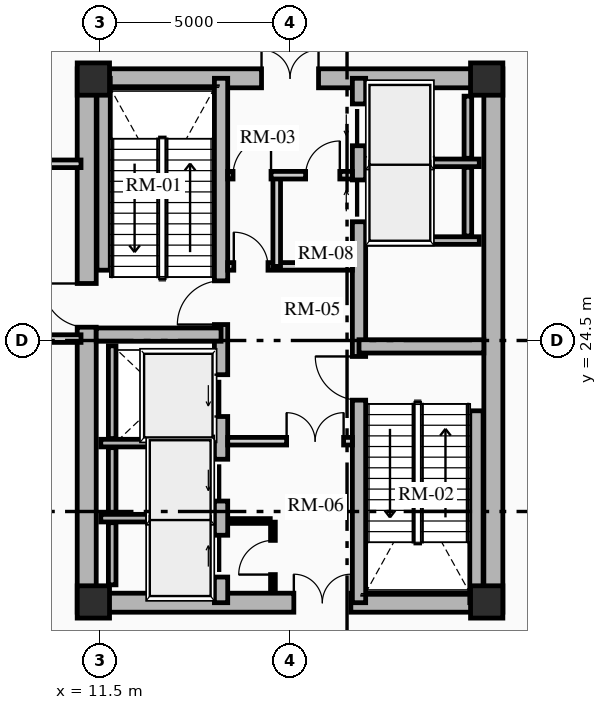
"""IFC4 building model, lengths in metres.
Left out: names, types, materials, properties, quantities, classifications, styles, units other than length and angle.
Written with IfcOpenShell. Run it as: python <this file> out.ifc"""

import sys

from ifc_helpers import new_model, si_unit, direction, frame, frame_2d, origin, origin_2d, place, context, subcontext, project, spatial, rectangle, extrude, source, transform, mapped, element, fill, save


model = new_model("IFC4")
c1 = context("Model", 3, precision=1e-05, world=origin(), true_north=direction((0.0, 1.0)))
c2 = subcontext(c1, "Body", "Model", "MODEL_VIEW")
j1 = project(units=[si_unit("LENGTHUNIT", "METRE"), si_unit("PLANEANGLEUNIT", "RADIAN")], contexts=[c1])
p1 = place(None, origin())
s1 = spatial("IfcSite", under=j1, at=p1, CompositionType="ELEMENT")
p2 = place(p1, origin())
s2 = spatial("IfcBuilding", under=s1, at=p2, CompositionType="ELEMENT")
p3 = place(p2, origin())
s3 = spatial("IfcBuildingStorey", under=s2, at=p3, CompositionType="ELEMENT", Elevation=0.0)
p4 = place(p3, frame((11.15, 17.35, 0.0), z_axis=(0.0, 0.0, 1.0), x_axis=(0.0, 1.0, 0.0)))
e1 = element("IfcWall", 1, at=p4, inside=s3, PredefinedType="SHEAR", context=c2, shape_type="SweptSolid", body=[
    extrude(rectangle(XDim=14.3, YDim=0.5, at=frame_2d((7.15, 0.0))), origin(), (0.0, 0.0, 1.0), 4.8),
])
m1 = source(origin(), c2, "Body", "SweptSolid", [
    extrude(rectangle(XDim=1.15, YDim=2.02, at=frame_2d((0.575, 1.01))), frame((0.0, 0.26, 0.0), z_axis=(0.0, -1.0, 0.0), x_axis=(1.0, 0.0, 0.0)), (0.0, 0.0, 1.0), 0.52),
])
p5 = place(p4, frame((7.5, 0.0, 0.0)))
e2 = element("IfcOpeningElement", 2, at=p5, cuts=e1, PredefinedType="OPENING", context=c2, shape_type="MappedRepresentation", body=[
    mapped(m1, transform((0.0, 0.0, 0.0), x_axis=(1.0, 0.0, 0.0), y_axis=(0.0, 1.0, 0.0), z_axis=(0.0, 0.0, 1.0), scale=1.0)),
])
p6 = place(p3, frame((21.85, 17.35, 0.0), z_axis=(0.0, 0.0, 1.0), x_axis=(0.0, 1.0, 0.0)))
e3 = element("IfcWall", 3, at=p6, inside=s3, PredefinedType="SHEAR", context=c2, shape_type="SweptSolid", body=[
    extrude(rectangle(XDim=14.3, YDim=0.5, at=frame_2d((7.15, 0.0))), origin(), (0.0, 0.0, 1.0), 4.8),
])
p7 = place(p3, frame((11.15, 17.6, 0.0), z_axis=(0.0, 0.0, 1.0), x_axis=(1.0, 0.0, 0.0)))
e4 = element("IfcWall", 4, at=p7, inside=s3, PredefinedType="SHEAR", context=c2, shape_type="SweptSolid", body=[
    extrude(rectangle(XDim=10.7, YDim=0.5, at=frame_2d((5.35, 0.0))), origin(), (0.0, 0.0, 1.0), 4.8),
])
m2 = source(origin(), c2, "Body", "SweptSolid", [
    extrude(rectangle(XDim=1.5, YDim=2.02, at=frame_2d((0.75, 1.01))), frame((0.0, 0.26, 0.0), z_axis=(0.0, -1.0, 0.0), x_axis=(1.0, 0.0, 0.0)), (0.0, 0.0, 1.0), 0.52),
])
p8 = place(p7, frame((5.45, 0.0, 0.0)))
e5 = element("IfcOpeningElement", 5, at=p8, cuts=e4, PredefinedType="OPENING", context=c2, shape_type="MappedRepresentation", body=[
    mapped(m2, transform((0.0, 0.0, 0.0), x_axis=(1.0, 0.0, 0.0), y_axis=(0.0, 1.0, 0.0), z_axis=(0.0, 0.0, 1.0), scale=1.0)),
])
p9 = place(p3, frame((11.15, 31.4, 0.0), z_axis=(0.0, 0.0, 1.0), x_axis=(1.0, 0.0, 0.0)))
e6 = element("IfcWall", 6, at=p9, inside=s3, PredefinedType="SHEAR", context=c2, shape_type="SweptSolid", body=[
    extrude(rectangle(XDim=10.7, YDim=0.5, at=frame_2d((5.35, 0.0))), origin(), (0.0, 0.0, 1.0), 4.8),
])
p10 = place(p9, frame((4.6, 0.0, 0.0)))
e7 = element("IfcOpeningElement", 7, at=p10, cuts=e6, PredefinedType="OPENING", context=c2, shape_type="MappedRepresentation", body=[
    mapped(m2, transform((0.0, 0.0, 0.0), x_axis=(1.0, 0.0, 0.0), y_axis=(0.0, 1.0, 0.0), z_axis=(0.0, 0.0, 1.0), scale=1.0)),
])
p11 = place(p3, frame((14.685, 17.6, 0.0), z_axis=(0.0, 0.0, 1.0), x_axis=(0.0, 1.0, 0.0)))
e8 = element("IfcWall", 8, at=p11, inside=s3, PredefinedType="SHEAR", context=c2, shape_type="SweptSolid", body=[
    extrude(rectangle(XDim=13.8, YDim=0.35, at=frame_2d((6.9, 0.0))), origin(), (0.0, 0.0, 1.0), 4.8),
])
m3 = source(origin(), c2, "Body", "SweptSolid", [
    extrude(rectangle(XDim=1.1, YDim=2.015, at=frame_2d((0.55, 1.007))), frame((0.0, 0.185, 0.0), z_axis=(0.0, -1.0, 0.0), x_axis=(1.0, 0.0, 0.0)), (0.0, 0.0, 1.0), 0.37),
])
p12 = place(p11, frame((4.9, 0.0, 0.0)))
e9 = element("IfcOpeningElement", 9, at=p12, cuts=e8, PredefinedType="OPENING", context=c2, shape_type="MappedRepresentation", body=[
    mapped(m3, transform((0.0, 0.0, 0.0), x_axis=(1.0, 0.0, 0.0), y_axis=(0.0, 1.0, 0.0), z_axis=(0.0, 0.0, 1.0), scale=1.0)),
])
p13 = place(p11, frame((0.675, 0.0, 0.0)))
e10 = element("IfcOpeningElement", 10, at=p13, cuts=e8, PredefinedType="OPENING", context=c2, shape_type="MappedRepresentation", body=[
    mapped(m3, transform((0.0, 0.0, 0.0), x_axis=(1.0, 0.0, 0.0), y_axis=(0.0, 1.0, 0.0), z_axis=(0.0, 0.0, 1.0), scale=1.0)),
])
p14 = place(p11, frame((2.675, 0.0, 0.0)))
e11 = element("IfcOpeningElement", 11, at=p14, cuts=e8, PredefinedType="OPENING", context=c2, shape_type="MappedRepresentation", body=[
    mapped(m3, transform((0.0, 0.0, 0.0), x_axis=(1.0, 0.0, 0.0), y_axis=(0.0, 1.0, 0.0), z_axis=(0.0, 0.0, 1.0), scale=1.0)),
])
m4 = source(origin(), c2, "Body", "SweptSolid", [
    extrude(rectangle(XDim=1.15, YDim=2.02, at=frame_2d((0.575, 1.01))), frame((0.0, 0.185, 0.0), z_axis=(0.0, -1.0, 0.0), x_axis=(1.0, 0.0, 0.0)), (0.0, 0.0, 1.0), 0.37),
])
p15 = place(p11, frame((7.32, 0.0, 0.0)))
e12 = element("IfcOpeningElement", 12, at=p15, cuts=e8, PredefinedType="OPENING", context=c2, shape_type="MappedRepresentation", body=[
    mapped(m4, transform((0.0, 0.0, 0.0), x_axis=(1.0, 0.0, 0.0), y_axis=(0.0, 1.0, 0.0), z_axis=(0.0, 0.0, 1.0), scale=1.0)),
])
p16 = place(p3, frame((18.315, 17.6, 0.0), z_axis=(0.0, 0.0, 1.0), x_axis=(0.0, 1.0, 0.0)))
e13 = element("IfcWall", 13, at=p16, inside=s3, PredefinedType="SHEAR", context=c2, shape_type="SweptSolid", body=[
    extrude(rectangle(XDim=13.8, YDim=0.35, at=frame_2d((6.9, 0.0))), origin(), (0.0, 0.0, 1.0), 4.8),
])
p17 = place(p16, frame((10.025, 0.0, 0.0)))
e14 = element("IfcOpeningElement", 14, at=p17, cuts=e13, PredefinedType="OPENING", context=c2, shape_type="MappedRepresentation", body=[
    mapped(m3, transform((0.0, 0.0, 0.0), x_axis=(1.0, 0.0, 0.0), y_axis=(0.0, 1.0, 0.0), z_axis=(0.0, 0.0, 1.0), scale=1.0)),
])
p18 = place(p16, frame((12.025, 0.0, 0.0)))
e15 = element("IfcOpeningElement", 15, at=p18, cuts=e13, PredefinedType="OPENING", context=c2, shape_type="MappedRepresentation", body=[
    mapped(m3, transform((0.0, 0.0, 0.0), x_axis=(1.0, 0.0, 0.0), y_axis=(0.0, 1.0, 0.0), z_axis=(0.0, 0.0, 1.0), scale=1.0)),
])
p19 = place(p16, frame((5.33, 0.0, 0.0)))
e16 = element("IfcOpeningElement", 16, at=p19, cuts=e13, PredefinedType="OPENING", context=c2, shape_type="MappedRepresentation", body=[
    mapped(m4, transform((0.0, 0.0, 0.0), x_axis=(1.0, 0.0, 0.0), y_axis=(0.0, 1.0, 0.0), z_axis=(0.0, 0.0, 1.0), scale=1.0)),
])
p20 = place(p3, frame((11.595, 26.35, 0.0), z_axis=(0.0, 0.0, 1.0), x_axis=(0.0, 1.0, 0.0)))
e17 = element("IfcWall", 17, at=p20, inside=s3, PredefinedType="SHEAR", context=c2, shape_type="SweptSolid", body=[
    extrude(rectangle(XDim=5.05, YDim=0.35, at=frame_2d((2.525, 0.0))), origin(), (0.0, 0.0, 1.0), 4.8),
])
p21 = place(p3, frame((11.4, 24.655, 0.0), z_axis=(0.0, 0.0, 1.0), x_axis=(1.0, 0.0, 0.0)))
e18 = element("IfcWall", 18, at=p21, inside=s3, PredefinedType="SHEAR", context=c2, shape_type="SweptSolid", body=[
    extrude(rectangle(XDim=3.285, YDim=0.35, at=frame_2d((1.643, 0.0))), origin(), (0.0, 0.0, 1.0), 4.8),
])
p22 = place(p3, frame((21.405, 17.6, 0.0), z_axis=(0.0, 0.0, 1.0), x_axis=(0.0, 1.0, 0.0)))
e19 = element("IfcWall", 19, at=p22, inside=s3, PredefinedType="SHEAR", context=c2, shape_type="SweptSolid", body=[
    extrude(rectangle(XDim=5.05, YDim=0.35, at=frame_2d((2.525, 0.0))), origin(), (0.0, 0.0, 1.0), 4.8),
])
p23 = place(p3, frame((18.315, 24.345, 0.0), z_axis=(0.0, 0.0, 1.0), x_axis=(1.0, 0.0, 0.0)))
e20 = element("IfcWall", 20, at=p23, inside=s3, PredefinedType="SHEAR", context=c2, shape_type="SweptSolid", body=[
    extrude(rectangle(XDim=3.285, YDim=0.35, at=frame_2d((1.643, 0.0))), origin(), (0.0, 0.0, 1.0), 4.8),
])
for number, where, z_axis, x_axis in (
    (21, (11.325, 17.62, 0.0), (0.0, 0.0, 1.0), (1.0, 0.0, 0.0)),
    (22, (11.325, 31.38, 0.0), (0.0, 0.0, 1.0), (1.0, 0.0, 0.0)),
    (23, (21.675, 17.62, 0.0), (0.0, 0.0, 1.0), (1.0, 0.0, 0.0)),
    (24, (21.675, 31.38, 0.0), (0.0, 0.0, 1.0), (1.0, 0.0, 0.0)),
):
    element("IfcColumn", number, at=place(p3, frame(where, z_axis=z_axis, x_axis=x_axis)), inside=s3, PredefinedType="COLUMN", context=c2, shape_type="SweptSolid", body=[
        extrude(rectangle(XDim=0.85, YDim=0.85, at=origin_2d()), origin(), (0.0, 0.0, 1.0), 4.8),
    ])
p24 = place(p3, frame((11.52, 21.8, 0.0), z_axis=(0.0, 0.0, 1.0), x_axis=(1.0, 0.0, 0.0)))
e25 = element("IfcWall", 25, at=p24, inside=s3, PredefinedType="SHEAR", context=c2, shape_type="SweptSolid", body=[
    extrude(rectangle(XDim=2.97, YDim=0.2, at=frame_2d((1.485, 0.0))), origin(), (0.0, 0.0, 1.0), 4.8),
])
p25 = place(p3, frame((11.82, 21.92, 0.0), z_axis=(0.0, 0.0, 1.0), x_axis=(0.0, 1.0, 0.0)))
e26 = element("IfcWall", 26, at=p25, inside=s3, PredefinedType="SHEAR", context=c2, shape_type="SweptSolid", body=[
    extrude(rectangle(XDim=2.44, YDim=0.2, at=frame_2d((1.22, 0.0))), origin(), (0.0, 0.0, 1.0), 4.8),
])
p26 = place(p3, frame((11.52, 19.825, 0.0), z_axis=(0.0, 0.0, 1.0), x_axis=(1.0, 0.0, 0.0)))
e27 = element("IfcWall", 27, at=p26, inside=s3, PredefinedType="SHEAR", context=c2, shape_type="SweptSolid", body=[
    extrude(rectangle(XDim=2.97, YDim=0.2, at=frame_2d((1.485, 0.0))), origin(), (0.0, 0.0, 1.0), 4.8),
])
p27 = place(p3, frame((11.82, 19.945, 0.0), z_axis=(0.0, 0.0, 1.0), x_axis=(0.0, 1.0, 0.0)))
e28 = element("IfcWall", 28, at=p27, inside=s3, PredefinedType="SHEAR", context=c2, shape_type="SweptSolid", body=[
    extrude(rectangle(XDim=1.735, YDim=0.2, at=frame_2d((0.867, 0.0))), origin(), (0.0, 0.0, 1.0), 4.8),
])
p28 = place(p3, frame((11.82, 18.07, 0.0), z_axis=(0.0, 0.0, 1.0), x_axis=(0.0, 1.0, 0.0)))
e29 = element("IfcWall", 29, at=p28, inside=s3, PredefinedType="SHEAR", context=c2, shape_type="SweptSolid", body=[
    extrude(rectangle(XDim=1.635, YDim=0.2, at=frame_2d((0.817, 0.0))), origin(), (0.0, 0.0, 1.0), 4.8),
])
for number, where, z_axis, x_axis in (
    (30, (18.51, 27.13, 0.0), (0.0, 0.0, 1.0), (1.0, 0.0, 0.0)),
    (31, (18.51, 29.175, 0.0), (0.0, 0.0, 1.0), (1.0, 0.0, 0.0)),
):
    element("IfcWall", number, at=place(p3, frame(where, z_axis=z_axis, x_axis=x_axis)), inside=s3, PredefinedType="SHEAR", context=c2, shape_type="SweptSolid", body=[
        extrude(rectangle(XDim=2.97, YDim=0.2, at=frame_2d((1.485, 0.0))), origin(), (0.0, 0.0, 1.0), 4.8),
    ])
p29 = place(p3, frame((21.18, 27.25, 0.0), z_axis=(0.0, 0.0, 1.0), x_axis=(0.0, 1.0, 0.0)))
e32 = element("IfcWall", 32, at=p29, inside=s3, PredefinedType="SHEAR", context=c2, shape_type="SweptSolid", body=[
    extrude(rectangle(XDim=1.805, YDim=0.2, at=frame_2d((0.902, 0.0))), origin(), (0.0, 0.0, 1.0), 4.8),
])
p30 = place(p3, frame((21.18, 29.295, 0.0), z_axis=(0.0, 0.0, 1.0), x_axis=(0.0, 1.0, 0.0)))
e33 = element("IfcWall", 33, at=p30, inside=s3, PredefinedType="SHEAR", context=c2, shape_type="SweptSolid", body=[
    extrude(rectangle(XDim=1.635, YDim=0.2, at=frame_2d((0.817, 0.0))), origin(), (0.0, 0.0, 1.0), 4.8),
])
p31 = place(p3, frame((14.86, 21.85, 0.0), z_axis=(0.0, 0.0, 1.0), x_axis=(1.0, 0.0, 0.0)))
e34 = element("IfcWall", 34, at=p31, inside=s3, PredefinedType="PARTITIONING", context=c2, shape_type="SweptSolid", body=[
    extrude(rectangle(XDim=3.28, YDim=0.2, at=frame_2d((1.64, 0.0))), origin(), (0.0, 0.0, 1.0), 4.485),
])
m5 = source(origin(), c2, "Body", "SweptSolid", [
    extrude(rectangle(XDim=1.5, YDim=2.02, at=frame_2d((0.75, 1.01))), frame((0.0, 0.11, 0.0), z_axis=(0.0, -1.0, 0.0), x_axis=(1.0, 0.0, 0.0)), (0.0, 0.0, 1.0), 0.22),
])
p32 = place(p31, frame((1.55, 0.0, 0.0)))
e35 = element("IfcOpeningElement", 35, at=p32, cuts=e34, PredefinedType="OPENING", context=c2, shape_type="MappedRepresentation", body=[
    mapped(m5, transform((0.0, 0.0, 0.0), x_axis=(1.0, 0.0, 0.0), y_axis=(0.0, 1.0, 0.0), z_axis=(0.0, 0.0, 1.0), scale=1.0)),
])
p33 = place(p3, frame((14.86, 26.45, 0.0), z_axis=(0.0, 0.0, 1.0), x_axis=(1.0, 0.0, 0.0)))
e36 = element("IfcWall", 36, at=p33, inside=s3, PredefinedType="PARTITIONING", context=c2, shape_type="SweptSolid", body=[
    extrude(rectangle(XDim=3.28, YDim=0.2, at=frame_2d((1.64, 0.0))), origin(), (0.0, 0.0, 1.0), 4.485),
])
m6 = source(origin(), c2, "Body", "SweptSolid", [
    extrude(rectangle(XDim=0.9, YDim=2.005, at=frame_2d((0.45, 1.002))), frame((0.0, 0.11, 0.0), z_axis=(0.0, -1.0, 0.0), x_axis=(1.0, 0.0, 0.0)), (0.0, 0.0, 1.0), 0.22),
])
p34 = place(p33, frame((0.16, 0.0, 0.0)))
e37 = element("IfcOpeningElement", 37, at=p34, cuts=e36, PredefinedType="OPENING", context=c2, shape_type="MappedRepresentation", body=[
    mapped(m6, transform((0.0, 0.0, 0.0), x_axis=(1.0, 0.0, 0.0), y_axis=(0.0, 1.0, 0.0), z_axis=(0.0, 0.0, 1.0), scale=1.0)),
])
p35 = place(p3, frame((16.15, 26.45, 0.0), z_axis=(0.0, 0.0, 1.0), x_axis=(0.0, 1.0, 0.0)))
e38 = element("IfcWall", 38, at=p35, inside=s3, PredefinedType="PARTITIONING", context=c2, shape_type="SweptSolid", body=[
    extrude(rectangle(XDim=2.4, YDim=0.2, at=frame_2d((1.2, 0.0))), origin(), (0.0, 0.0, 1.0), 4.485),
])
p36 = place(p3, frame((14.86, 28.85, 0.0), z_axis=(0.0, 0.0, 1.0), x_axis=(1.0, 0.0, 0.0)))
e39 = element("IfcWall", 39, at=p36, inside=s3, PredefinedType="PARTITIONING", context=c2, shape_type="SweptSolid", body=[
    extrude(rectangle(XDim=3.28, YDim=0.2, at=frame_2d((1.64, 0.0))), origin(), (0.0, 0.0, 1.0), 4.485),
])
m7 = source(origin(), c2, "Body", "SweptSolid", [
    extrude(rectangle(XDim=1.0, YDim=2.015, at=frame_2d((0.5, 1.007))), frame((0.0, 0.11, 0.0), z_axis=(0.0, -1.0, 0.0), x_axis=(1.0, 0.0, 0.0)), (0.0, 0.0, 1.0), 0.22),
])
p37 = place(p36, frame((0.14, 0.0, 0.0)))
e40 = element("IfcOpeningElement", 40, at=p37, cuts=e39, PredefinedType="OPENING", context=c2, shape_type="MappedRepresentation", body=[
    mapped(m7, transform((0.0, 0.0, 0.0), x_axis=(1.0, 0.0, 0.0), y_axis=(0.0, 1.0, 0.0), z_axis=(0.0, 0.0, 1.0), scale=1.0)),
])
p38 = place(p36, frame((2.05, 0.0, 0.0)))
e41 = element("IfcOpeningElement", 41, at=p38, cuts=e39, PredefinedType="OPENING", context=c2, shape_type="MappedRepresentation", body=[
    mapped(m6, transform((0.0, 0.0, 0.0), x_axis=(1.0, 0.0, 0.0), y_axis=(0.0, 1.0, 0.0), z_axis=(0.0, 0.0, 1.0), scale=1.0)),
])
p39 = place(p3, frame((16.05, 17.92, 0.0), z_axis=(0.0, 0.0, 1.0), x_axis=(0.0, 1.0, 0.0)))
e42 = element("IfcWall", 42, at=p39, inside=s3, PredefinedType="PARTITIONING", context=c2, shape_type="SweptSolid", body=[
    extrude(rectangle(XDim=1.8, YDim=0.125, at=frame_2d((0.9, 0.0))), origin(), (0.0, 0.0, 1.0), 4.485),
])
m8 = source(origin(), c2, "Body", "SweptSolid", [
    extrude(rectangle(XDim=0.9, YDim=2.005, at=frame_2d((0.45, 1.002))), frame((0.0, 0.073, 0.0), z_axis=(0.0, -1.0, 0.0), x_axis=(1.0, 0.0, 0.0)), (0.0, 0.0, 1.0), 0.145),
])
p40 = place(p39, frame((0.42, 0.0, 0.0)))
e43 = element("IfcOpeningElement", 43, at=p40, cuts=e42, PredefinedType="OPENING", context=c2, shape_type="MappedRepresentation", body=[
    mapped(m8, transform((0.0, 0.0, 0.0), x_axis=(1.0, 0.0, 0.0), y_axis=(0.0, 1.0, 0.0), z_axis=(0.0, 0.0, 1.0), scale=1.0)),
])
p41 = place(p3, frame((14.88, 19.75, 0.0), z_axis=(0.0, 0.0, 1.0), x_axis=(1.0, 0.0, 0.0)))
e44 = element("IfcWall", 44, at=p41, inside=s3, PredefinedType="PARTITIONING", context=c2, shape_type="SweptSolid", body=[
    extrude(rectangle(XDim=1.1, YDim=0.125, at=frame_2d((0.55, 0.0))), origin(), (0.0, 0.0, 1.0), 4.485),
])
p42 = place(p3, frame((0.45, 29.15, 0.0), z_axis=(0.0, 0.0, 1.0), x_axis=(1.0, 0.0, 0.0)))
e45 = element("IfcWall", 45, at=p42, inside=s3, PredefinedType="PARTITIONING", context=c2, shape_type="SweptSolid", body=[
    extrude(rectangle(XDim=10.55, YDim=0.2, at=frame_2d((5.275, 0.0))), origin(), (0.0, 0.0, 1.0), 3.529),
])
p43 = place(p3, frame((6.4, 24.55, 0.0), z_axis=(0.0, 0.0, 1.0), x_axis=(1.0, 0.0, 0.0)))
e46 = element("IfcWall", 46, at=p43, inside=s3, PredefinedType="PARTITIONING", context=c2, shape_type="SweptSolid", body=[
    extrude(rectangle(XDim=4.6, YDim=0.2, at=frame_2d((2.3, 0.0))), origin(), (0.0, 0.0, 1.0), 4.485),
])
m9 = source(origin(), c2, "Body", "SweptSolid", [
    extrude(rectangle(XDim=1.1, YDim=2.015, at=frame_2d((0.55, 1.007))), frame((0.0, 0.025, 0.0), z_axis=(0.0, -1.0, 0.0), x_axis=(1.0, 0.0, 0.0)), (0.0, 0.0, 1.0), 0.05),
])
p44 = place(p12, origin())
e47 = element("IfcDoor", 47, at=p44, inside=s3, OperationType="SLIDING_TO_LEFT", PredefinedType="DOOR", context=c2, shape_type="MappedRepresentation", body=[
    mapped(m9, transform((0.0, 0.0, 0.0), x_axis=(1.0, 0.0, 0.0), y_axis=(0.0, 1.0, 0.0), z_axis=(0.0, 0.0, 1.0), scale=1.0)),
])
fill(e9, e47)
p45 = place(p13, origin())
e48 = element("IfcDoor", 48, at=p45, inside=s3, OperationType="SLIDING_TO_RIGHT", PredefinedType="DOOR", context=c2, shape_type="MappedRepresentation", body=[
    mapped(m9, transform((0.0, 0.0, 0.0), x_axis=(1.0, 0.0, 0.0), y_axis=(0.0, 1.0, 0.0), z_axis=(0.0, 0.0, 1.0), scale=1.0)),
])
fill(e10, e48)
p46 = place(p14, origin())
e49 = element("IfcDoor", 49, at=p46, inside=s3, OperationType="SLIDING_TO_LEFT", PredefinedType="DOOR", context=c2, shape_type="MappedRepresentation", body=[
    mapped(m9, transform((0.0, 0.0, 0.0), x_axis=(1.0, 0.0, 0.0), y_axis=(0.0, 1.0, 0.0), z_axis=(0.0, 0.0, 1.0), scale=1.0)),
])
fill(e11, e49)
p47 = place(p17, origin())
e50 = element("IfcDoor", 50, at=p47, inside=s3, OperationType="SLIDING_TO_RIGHT", PredefinedType="DOOR", context=c2, shape_type="MappedRepresentation", body=[
    mapped(m9, transform((0.0, 0.0, 0.0), x_axis=(1.0, 0.0, 0.0), y_axis=(0.0, 1.0, 0.0), z_axis=(0.0, 0.0, 1.0), scale=1.0)),
])
fill(e14, e50)
p48 = place(p18, origin())
e51 = element("IfcDoor", 51, at=p48, inside=s3, OperationType="SLIDING_TO_LEFT", PredefinedType="DOOR", context=c2, shape_type="MappedRepresentation", body=[
    mapped(m9, transform((0.0, 0.0, 0.0), x_axis=(1.0, 0.0, 0.0), y_axis=(0.0, 1.0, 0.0), z_axis=(0.0, 0.0, 1.0), scale=1.0)),
])
fill(e15, e51)
m10 = source(origin(), c2, "Body", "SweptSolid", [
    extrude(rectangle(XDim=1.15, YDim=2.02, at=frame_2d((0.575, 1.01))), frame((0.0, 0.025, 0.0), z_axis=(0.0, -1.0, 0.0), x_axis=(1.0, 0.0, 0.0)), (0.0, 0.0, 1.0), 0.05),
])
p49 = place(p15, origin())
e52 = element("IfcDoor", 52, at=p49, inside=s3, OperationType="SINGLE_SWING_LEFT", PredefinedType="DOOR", context=c2, shape_type="MappedRepresentation", body=[
    mapped(m10, transform((0.0, 0.0, 0.0), x_axis=(1.0, 0.0, 0.0), y_axis=(0.0, 1.0, 0.0), z_axis=(0.0, 0.0, 1.0), scale=1.0)),
])
fill(e12, e52)
p50 = place(p19, origin())
e53 = element("IfcDoor", 53, at=p50, inside=s3, OperationType="SINGLE_SWING_RIGHT", PredefinedType="DOOR", context=c2, shape_type="MappedRepresentation", body=[
    mapped(m10, transform((0.0, 0.0, 0.0), x_axis=(1.0, 0.0, 0.0), y_axis=(0.0, 1.0, 0.0), z_axis=(0.0, 0.0, 1.0), scale=1.0)),
])
fill(e16, e53)
m11 = source(origin(), c2, "Body", "SweptSolid", [
    extrude(rectangle(XDim=1.5, YDim=2.02, at=frame_2d((0.75, 1.01))), frame((0.0, 0.025, 0.0), z_axis=(0.0, -1.0, 0.0), x_axis=(1.0, 0.0, 0.0)), (0.0, 0.0, 1.0), 0.05),
])
p51 = place(p10, origin())
e54 = element("IfcDoor", 54, at=p51, inside=s3, OperationType="DOUBLE_DOOR_SINGLE_SWING", PredefinedType="DOOR", context=c2, shape_type="MappedRepresentation", body=[
    mapped(m11, transform((0.0, 0.0, 0.0), x_axis=(1.0, 0.0, 0.0), y_axis=(0.0, 1.0, 0.0), z_axis=(0.0, 0.0, 1.0), scale=1.0)),
])
fill(e7, e54)
p52 = place(p8, origin())
e55 = element("IfcDoor", 55, at=p52, inside=s3, OperationType="DOUBLE_DOOR_SINGLE_SWING", PredefinedType="DOOR", context=c2, shape_type="MappedRepresentation", body=[
    mapped(m11, transform((0.0, 0.0, 0.0), x_axis=(1.0, 0.0, 0.0), y_axis=(0.0, 1.0, 0.0), z_axis=(0.0, 0.0, 1.0), scale=1.0)),
])
fill(e5, e55)
p53 = place(p32, origin())
e56 = element("IfcDoor", 56, at=p53, inside=s3, OperationType="DOUBLE_DOOR_SINGLE_SWING", PredefinedType="DOOR", context=c2, shape_type="MappedRepresentation", body=[
    mapped(m11, transform((0.0, 0.0, 0.0), x_axis=(1.0, 0.0, 0.0), y_axis=(0.0, 1.0, 0.0), z_axis=(0.0, 0.0, 1.0), scale=1.0)),
])
fill(e35, e56)
m12 = source(origin(), c2, "Body", "SweptSolid", [
    extrude(rectangle(XDim=0.9, YDim=2.005, at=frame_2d((0.45, 1.002))), frame((0.0, 0.025, 0.0), z_axis=(0.0, -1.0, 0.0), x_axis=(1.0, 0.0, 0.0)), (0.0, 0.0, 1.0), 0.05),
])
p54 = place(p34, origin())
e57 = element("IfcDoor", 57, at=p54, inside=s3, OperationType="SINGLE_SWING_LEFT", PredefinedType="DOOR", context=c2, shape_type="MappedRepresentation", body=[
    mapped(m12, transform((0.0, 0.0, 0.0), x_axis=(1.0, 0.0, 0.0), y_axis=(0.0, 1.0, 0.0), z_axis=(0.0, 0.0, 1.0), scale=1.0)),
])
fill(e37, e57)
m13 = source(origin(), c2, "Body", "SweptSolid", [
    extrude(rectangle(XDim=1.0, YDim=2.015, at=frame_2d((0.5, 1.007))), frame((0.0, 0.025, 0.0), z_axis=(0.0, -1.0, 0.0), x_axis=(1.0, 0.0, 0.0)), (0.0, 0.0, 1.0), 0.05),
])
p55 = place(p37, origin())
e58 = element("IfcDoor", 58, at=p55, inside=s3, OperationType="SINGLE_SWING_RIGHT", PredefinedType="DOOR", context=c2, shape_type="MappedRepresentation", body=[
    mapped(m13, transform((0.0, 0.0, 0.0), x_axis=(1.0, 0.0, 0.0), y_axis=(0.0, 1.0, 0.0), z_axis=(0.0, 0.0, 1.0), scale=1.0)),
])
fill(e40, e58)
p56 = place(p40, origin())
e59 = element("IfcDoor", 59, at=p56, inside=s3, OperationType="SINGLE_SWING_LEFT", PredefinedType="DOOR", context=c2, shape_type="MappedRepresentation", body=[
    mapped(m12, transform((0.0, 0.0, 0.0), x_axis=(1.0, 0.0, 0.0), y_axis=(0.0, 1.0, 0.0), z_axis=(0.0, 0.0, 1.0), scale=1.0)),
])
fill(e43, e59)
p57 = place(p38, origin())
e60 = element("IfcDoor", 60, at=p57, inside=s3, OperationType="SINGLE_SWING_RIGHT", PredefinedType="DOOR", context=c2, shape_type="MappedRepresentation", body=[
    mapped(m12, transform((0.0, 0.0, 0.0), x_axis=(1.0, 0.0, 0.0), y_axis=(0.0, 1.0, 0.0), z_axis=(0.0, 0.0, 1.0), scale=1.0)),
])
fill(e41, e60)
p58 = place(p5, origin())
e61 = element("IfcDoor", 61, at=p58, inside=s3, OperationType="SINGLE_SWING_RIGHT", PredefinedType="DOOR", context=c2, shape_type="MappedRepresentation", body=[
    mapped(m10, transform((0.0, 0.0, 0.0), x_axis=(1.0, 0.0, 0.0), y_axis=(0.0, 1.0, 0.0), z_axis=(0.0, 0.0, 1.0), scale=1.0)),
])
fill(e2, e61)
save(model, sys.argv[1])
